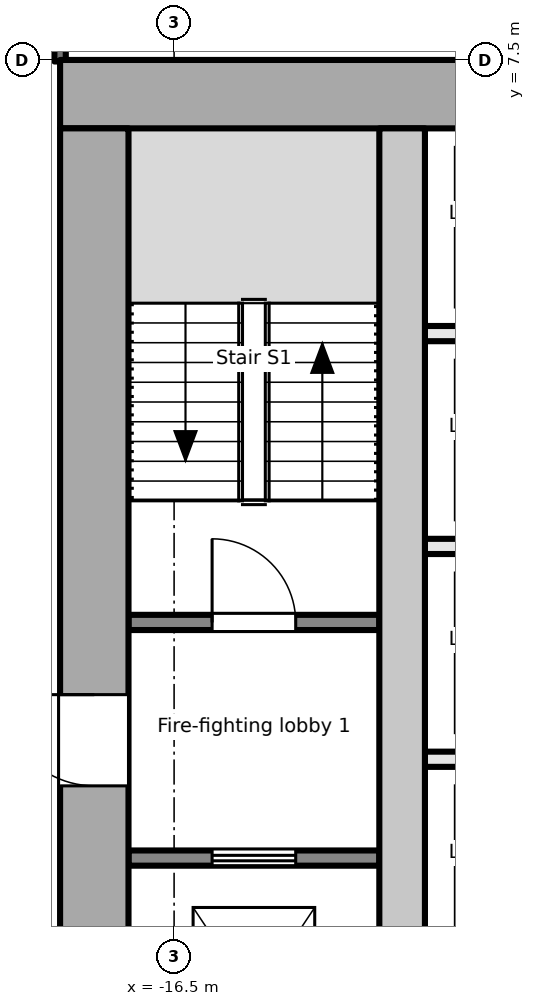
"""IFC4 building model, lengths in metres.
Left out: names, types, materials, properties, quantities, classifications, styles, units other than length and angle.
Written with IfcOpenShell. Run it as: python <this file> out.ifc"""

import sys

from ifc_helpers import new_model, si_unit, direction, frame, frame_2d, origin, place, context, subcontext, project, spatial, rectangle, extrude, element, fill, save


model = new_model("IFC4")
c1 = context("Model", 3, precision=1e-05, world=origin(), true_north=direction((0.0, 1.0)))
c2 = subcontext(c1, "Body", "Model", "MODEL_VIEW")
j1 = project(units=[si_unit("LENGTHUNIT", "METRE"), si_unit("PLANEANGLEUNIT", "RADIAN")], contexts=[c1])
p1 = place(None, origin())
s1 = spatial("IfcSite", under=j1, at=p1, CompositionType="ELEMENT")
p2 = place(p1, origin())
s2 = spatial("IfcBuilding", under=s1, at=p2, CompositionType="ELEMENT")
p3 = place(p2, frame((0.0, 0.0, 61.1)))
s3 = spatial("IfcBuildingStorey", under=s2, at=p3, CompositionType="ELEMENT", Elevation=61.1)
p4 = place(p3, frame((-18.0, 7.05, -0.2), z_axis=(0.0, 0.0, 1.0), x_axis=(1.0, 0.0, 0.0)))
e1 = element("IfcWall", 1, at=p4, inside=s3, PredefinedType="SHEAR", context=c2, shape_type="SweptSolid", body=[
    extrude(rectangle(XDim=36.0, YDim=0.9, at=frame_2d((18.0, 0.0))), origin(), (0.0, 0.0, 1.0), 4.1),
])
p5 = place(p3, frame((-17.55, -6.6, -0.2), z_axis=(0.0, 0.0, 1.0), x_axis=(0.0, 1.0, 0.0)))
e2 = element("IfcWall", 2, at=p5, inside=s3, PredefinedType="SHEAR", context=c2, shape_type="SweptSolid", body=[
    extrude(rectangle(XDim=13.2, YDim=0.9, at=frame_2d((6.6, 0.0))), origin(), (0.0, 0.0, 1.0), 4.1),
])
p6 = place(p5, frame((4.55, 0.0, 0.2)))
e3 = element("IfcOpeningElement", 3, at=p6, cuts=e2, PredefinedType="OPENING", context=c2, shape_type="SweptSolid", body=[
    extrude(rectangle(XDim=1.2, YDim=2.1, at=frame_2d((0.6, 1.05))), frame((0.0, 0.46, 0.0), z_axis=(0.0, -1.0, 0.0), x_axis=(1.0, 0.0, 0.0)), (0.0, 0.0, 1.0), 0.921),
])
p7 = place(p3, frame((-13.5, -6.6, -0.2), z_axis=(0.0, 0.0, 1.0), x_axis=(0.0, 1.0, 0.0)))
e4 = element("IfcWall", 4, at=p7, inside=s3, PredefinedType="SHEAR", context=c2, shape_type="SweptSolid", body=[
    extrude(rectangle(XDim=13.2, YDim=0.6, at=frame_2d((6.6, 0.0))), origin(), (0.0, 0.0, 1.0), 4.1),
])
p8 = place(p3, frame((-17.1, -3.0, 0.0), z_axis=(0.0, 0.0, 1.0), x_axis=(1.0, 0.0, 0.0)))
e5 = element("IfcWall", 5, at=p8, inside=s3, PredefinedType="PARTITIONING", context=c2, shape_type="SweptSolid", body=[
    extrude(rectangle(XDim=3.3, YDim=0.2, at=frame_2d((1.65, 0.0))), origin(), (0.0, 0.0, 1.0), 3.9),
])
p9 = place(p8, frame((1.1, 0.0, 0.0)))
e6 = element("IfcOpeningElement", 6, at=p9, cuts=e5, PredefinedType="OPENING", context=c2, shape_type="SweptSolid", body=[
    extrude(rectangle(XDim=1.1, YDim=2.1, at=frame_2d((0.55, 1.05))), frame((0.0, 0.111, 0.0), z_axis=(0.0, -1.0, 0.0), x_axis=(1.0, 0.0, 0.0)), (0.0, 0.0, 1.0), 0.221),
])
p10 = place(p3, frame((-17.1, 0.1, 0.0), z_axis=(0.0, 0.0, 1.0), x_axis=(1.0, 0.0, 0.0)))
e7 = element("IfcWall", 7, at=p10, inside=s3, PredefinedType="PARTITIONING", context=c2, shape_type="SweptSolid", body=[
    extrude(rectangle(XDim=3.3, YDim=0.2, at=frame_2d((1.65, 0.0))), origin(), (0.0, 0.0, 1.0), 3.9),
])
p11 = place(p10, frame((1.1, 0.0, 0.0)))
e8 = element("IfcOpeningElement", 8, at=p11, cuts=e7, PredefinedType="OPENING", context=c2, shape_type="SweptSolid", body=[
    extrude(rectangle(XDim=1.1, YDim=2.1, at=frame_2d((0.55, 1.05))), frame((0.0, 0.111, 0.0), z_axis=(0.0, -1.0, 0.0), x_axis=(1.0, 0.0, 0.0)), (0.0, 0.0, 1.0), 0.221),
])
for number, where, z_axis, x_axis in (
    (9, (-13.2, -1.7, 0.0), (0.0, 0.0, 1.0), (1.0, 0.0, 0.0)),
    (10, (-13.2, 1.1, 0.0), (0.0, 0.0, 1.0), (1.0, 0.0, 0.0)),
    (11, (-13.2, 3.9, 0.0), (0.0, 0.0, 1.0), (1.0, 0.0, 0.0)),
):
    element("IfcWall", number, at=place(p3, frame(where, z_axis=z_axis, x_axis=x_axis)), inside=s3, PredefinedType="PARTITIONING", context=c2, shape_type="SweptSolid", body=[
        extrude(rectangle(XDim=2.3, YDim=0.2, at=frame_2d((1.15, 0.0))), origin(), (0.0, 0.0, 1.0), 3.9),
    ])
p12 = place(p3, frame((-18.0, 9.74, 0.0), z_axis=(0.0, 0.0, 1.0), x_axis=(0.0, -1.0, 0.0)))
e12 = element("IfcWall", 12, at=p12, inside=s3, PredefinedType="PARTITIONING", context=c2, shape_type="SweptSolid", body=[
    extrude(rectangle(XDim=2.26, YDim=0.15, at=frame_2d((1.13, 0.0))), origin(), (0.0, 0.0, 1.0), 2.9),
])
p13 = place(p12, frame((0.895, 0.0, 0.0)))
e13 = element("IfcOpeningElement", 13, at=p13, cuts=e12, PredefinedType="OPENING", context=c2, shape_type="SweptSolid", body=[
    extrude(rectangle(XDim=0.9, YDim=2.1, at=frame_2d((0.45, 1.05))), frame((0.0, 0.085, 0.0), z_axis=(0.0, -1.0, 0.0), x_axis=(1.0, 0.0, 0.0)), (0.0, 0.0, 1.0), 0.171),
])
p14 = place(p9, origin())
e14 = element("IfcDoor", 14, at=p14, inside=s3, OperationType="DOUBLE_DOOR_SLIDING", PredefinedType="DOOR", context=c2, shape_type="SweptSolid", body=[
    extrude(rectangle(XDim=1.1, YDim=2.1, at=frame_2d((0.55, 1.05))), frame((0.0, 0.025, 0.0), z_axis=(0.0, -1.0, 0.0), x_axis=(1.0, 0.0, 0.0)), (0.0, 0.0, 1.0), 0.05),
])
fill(e6, e14)
p15 = place(p6, origin())
e15 = element("IfcDoor", 15, at=p15, inside=s3, OperationType="SINGLE_SWING_RIGHT", PredefinedType="DOOR", context=c2, shape_type="SweptSolid", body=[
    extrude(rectangle(XDim=1.2, YDim=2.1, at=frame_2d((0.6, 1.05))), frame((0.0, 0.025, 0.0), z_axis=(0.0, -1.0, 0.0), x_axis=(1.0, 0.0, 0.0)), (0.0, 0.0, 1.0), 0.05),
])
fill(e3, e15)
p16 = place(p11, origin())
e16 = element("IfcDoor", 16, at=p16, inside=s3, OperationType="SINGLE_SWING_LEFT", PredefinedType="DOOR", context=c2, shape_type="SweptSolid", body=[
    extrude(rectangle(XDim=1.1, YDim=2.1, at=frame_2d((0.55, 1.05))), frame((0.0, 0.025, 0.0), z_axis=(0.0, -1.0, 0.0), x_axis=(1.0, 0.0, 0.0)), (0.0, 0.0, 1.0), 0.05),
])
fill(e8, e16)
save(model, sys.argv[1])
